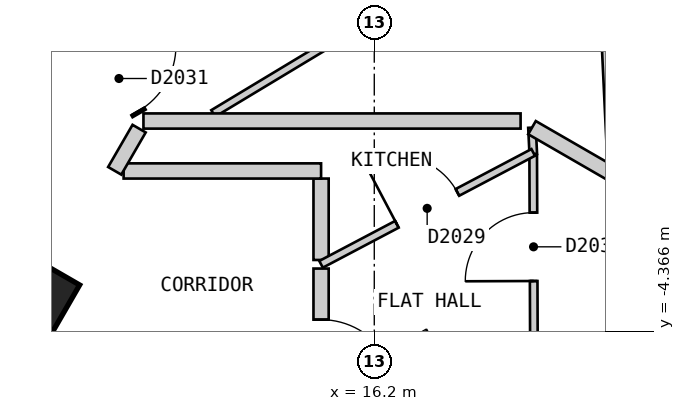
"""IFC4 building model, lengths in metres.
Left out: names, types, materials, properties, quantities, classifications, styles, units other than length and angle.
Written with IfcOpenShell. Run it as: python <this file> out.ifc"""

import sys

from ifc_helpers import new_model, si_unit, direction, frame, frame_2d, origin, origin_2d, place, context, subcontext, project, spatial, polyline, rectangle, outline, extrude, element, fill, save


model = new_model("IFC4")
c1 = context("Model", 3, precision=1e-05, world=origin(), true_north=direction((0.0, 1.0)))
c2 = subcontext(c1, "Body", "Model", "MODEL_VIEW")
j1 = project(units=[si_unit("LENGTHUNIT", "METRE"), si_unit("PLANEANGLEUNIT", "RADIAN")], contexts=[c1])
p1 = place(None, origin())
s1 = spatial("IfcSite", under=j1, at=p1, CompositionType="ELEMENT")
p2 = place(p1, origin())
s2 = spatial("IfcBuilding", under=s1, at=p2, CompositionType="ELEMENT")
p3 = place(p2, frame((0.0, 0.0, 238.8)))
s3 = spatial("IfcBuildingStorey", under=s2, at=p3, CompositionType="ELEMENT", Elevation=238.8)
p4 = place(p3, frame((11.845, -3.884, 0.0), z_axis=(0.0, 0.0, 1.0), x_axis=(0.499984884929, 0.866034130299, 0.0)))
e1 = element("IfcColumn", 1, at=p4, inside=s3, PredefinedType="COLUMN", context=c2, shape_type="SweptSolid", body=[
    extrude(rectangle(XDim=0.7, YDim=0.7, at=origin_2d()), origin(), (0.0, 0.0, 1.0), 3.0),
])
p5 = place(p3, frame((15.285, -18.425, 0.0), z_axis=(0.0, 0.0, 1.0), x_axis=(0.500012653391, 0.866018098222, 0.0)))
e2 = element("IfcWall", 2, at=p5, inside=s3, PredefinedType="SOLIDWALL", context=c2, shape_type="SweptSolid", body=[
    extrude(outline(polyline([(0.0, -0.15), (16.628, -0.15), (16.548, 0.15), (0.08, 0.15), (0.0, -0.15)])), origin(), (0.0, 0.0, 1.0), 2.7),
])
p6 = place(p5, frame((1.165, 0.0, 0.15)))
e3 = element("IfcOpeningElement", 3, at=p6, cuts=e2, PredefinedType="OPENING", context=c2, shape_type="SweptSolid", body=[
    extrude(rectangle(XDim=1.5, YDim=2.1, at=frame_2d((0.75, 1.05))), frame((0.0, 0.16, 0.0), z_axis=(0.0, -1.0, 0.0), x_axis=(1.0, 0.0, 0.0)), (0.0, 0.0, 1.0), 0.32),
])
p7 = place(p5, frame((3.724, 0.0, 0.15)))
e4 = element("IfcOpeningElement", 4, at=p7, cuts=e2, PredefinedType="OPENING", context=c2, shape_type="SweptSolid", body=[
    extrude(rectangle(XDim=1.5, YDim=2.1, at=frame_2d((0.75, 1.05))), frame((0.0, 0.16, 0.0), z_axis=(0.0, -1.0, 0.0), x_axis=(1.0, 0.0, 0.0)), (0.0, 0.0, 1.0), 0.32),
])
p8 = place(p5, frame((6.283, 0.0, 0.15)))
e5 = element("IfcOpeningElement", 5, at=p8, cuts=e2, PredefinedType="OPENING", context=c2, shape_type="SweptSolid", body=[
    extrude(rectangle(XDim=1.5, YDim=2.1, at=frame_2d((0.75, 1.05))), frame((0.0, 0.16, 0.0), z_axis=(0.0, -1.0, 0.0), x_axis=(1.0, 0.0, 0.0)), (0.0, 0.0, 1.0), 0.32),
])
p9 = place(p5, frame((8.843, 0.0, 0.15)))
e6 = element("IfcOpeningElement", 6, at=p9, cuts=e2, PredefinedType="OPENING", context=c2, shape_type="SweptSolid", body=[
    extrude(rectangle(XDim=1.5, YDim=2.1, at=frame_2d((0.75, 1.05))), frame((0.0, 0.16, 0.0), z_axis=(0.0, -1.0, 0.0), x_axis=(1.0, 0.0, 0.0)), (0.0, 0.0, 1.0), 0.32),
])
p10 = place(p5, frame((11.402, 0.0, 0.15)))
e7 = element("IfcOpeningElement", 7, at=p10, cuts=e2, PredefinedType="OPENING", context=c2, shape_type="SweptSolid", body=[
    extrude(rectangle(XDim=1.5, YDim=2.1, at=frame_2d((0.75, 1.05))), frame((0.0, 0.16, 0.0), z_axis=(0.0, -1.0, 0.0), x_axis=(1.0, 0.0, 0.0)), (0.0, 0.0, 1.0), 0.32),
])
p11 = place(p5, frame((13.962, 0.0, 0.15)))
e8 = element("IfcOpeningElement", 8, at=p11, cuts=e2, PredefinedType="OPENING", context=c2, shape_type="SweptSolid", body=[
    extrude(rectangle(XDim=1.5, YDim=2.1, at=frame_2d((0.75, 1.05))), frame((0.0, 0.16, 0.0), z_axis=(0.0, -1.0, 0.0), x_axis=(1.0, 0.0, 0.0)), (0.0, 0.0, 1.0), 0.32),
])
p12 = place(p3, frame((9.238, 5.2, 0.0), z_axis=(0.0, 0.0, 1.0), x_axis=(0.500025705601, -0.86601056214, 0.0)))
e9 = element("IfcWall", 9, at=p12, inside=s3, PredefinedType="PARTITIONING", context=c2, shape_type="SweptSolid", body=[
    extrude(rectangle(XDim=7.735, YDim=0.2, at=frame_2d((3.868, 0.0))), origin(), (0.0, 0.0, 1.0), 2.7),
])
p13 = place(p12, frame((6.705, 0.0, 0.0)))
e10 = element("IfcOpeningElement", 10, at=p13, cuts=e9, PredefinedType="OPENING", context=c2, shape_type="SweptSolid", body=[
    extrude(rectangle(XDim=1.0, YDim=2.1, at=frame_2d((0.5, 1.05))), frame((0.0, 0.11, 0.0), z_axis=(0.0, -1.0, 0.0), x_axis=(1.0, 0.0, 0.0)), (0.0, 0.0, 1.0), 0.22),
])
p14 = place(p12, frame((1.988, 0.0, 0.0)))
e11 = element("IfcOpeningElement", 11, at=p14, cuts=e9, PredefinedType="OPENING", context=c2, shape_type="SweptSolid", body=[
    extrude(rectangle(XDim=1.0, YDim=2.1, at=frame_2d((0.5, 1.05))), frame((0.0, 0.11, 0.0), z_axis=(0.0, -1.0, 0.0), x_axis=(1.0, 0.0, 0.0)), (0.0, 0.0, 1.0), 0.22),
])
p15 = place(p3, frame((15.5, -2.356, 0.0), z_axis=(0.0, 0.0, 1.0), x_axis=(0.0, -1.0, 0.0)))
e12 = element("IfcWall", 12, at=p15, inside=s3, PredefinedType="PARTITIONING", context=c2, shape_type="SweptSolid", body=[
    extrude(rectangle(XDim=1.071, YDim=0.2, at=frame_2d((0.536, 0.0))), origin(), (0.0, 0.0, 1.0), 2.7),
])
p16 = place(p3, frame((12.902, -2.256, 0.0), z_axis=(0.0, 0.0, 1.0), x_axis=(1.0, 0.0, 0.0)))
e13 = element("IfcWall", 13, at=p16, inside=s3, PredefinedType="PARTITIONING", context=c2, shape_type="SweptSolid", body=[
    extrude(rectangle(XDim=2.598, YDim=0.2, at=frame_2d((1.299, 0.0))), origin(), (0.0, 0.0, 1.0), 2.7),
])
p17 = place(p3, frame((12.785, -2.254, 0.0), z_axis=(0.0, 0.0, 1.0), x_axis=(0.500766044352, 0.865582675903, 0.0)))
e14 = element("IfcWall", 14, at=p17, inside=s3, PredefinedType="PARTITIONING", context=c2, shape_type="SweptSolid", body=[
    extrude(rectangle(XDim=0.641, YDim=0.2, at=frame_2d((0.321, 0.0))), origin(), (0.0, 0.0, 1.0), 2.7),
])
p18 = place(p3, frame((15.5, -5.856, 0.0), z_axis=(0.0, 0.0, 1.0), x_axis=(0.0, 1.0, 0.0)))
e15 = element("IfcWall", 15, at=p18, inside=s3, PredefinedType="PARTITIONING", context=c2, shape_type="SweptSolid", body=[
    extrude(rectangle(XDim=2.316, YDim=0.2, at=frame_2d((1.158, 0.0))), origin(), (0.0, 0.0, 1.0), 2.7),
])
p19 = place(p18, frame((0.644, 0.0, 0.0)))
e16 = element("IfcOpeningElement", 16, at=p19, cuts=e15, PredefinedType="OPENING", context=c2, shape_type="SweptSolid", body=[
    extrude(rectangle(XDim=1.0, YDim=2.1, at=frame_2d((0.5, 1.05))), frame((0.0, 0.11, 0.0), z_axis=(0.0, -1.0, 0.0), x_axis=(1.0, 0.0, 0.0)), (0.0, 0.0, 1.0), 0.22),
])
p20 = place(p3, frame((18.275, -1.686, 0.0), z_axis=(0.0, 0.0, 1.0), x_axis=(0.049063646166, -0.998795654088, 0.0)))
e17 = element("IfcWall", 17, at=p20, inside=s3, PredefinedType="PARTITIONING", context=c2, shape_type="SweptSolid", body=[
    extrude(rectangle(XDim=0.348, YDim=0.1, at=frame_2d((0.174, 0.0))), origin(), (0.0, 0.0, 1.0), 2.7),
])
p21 = place(p3, frame((19.151, 1.343, 0.0), z_axis=(0.0, 0.0, 1.0), x_axis=(0.047509130714, -0.998870803707, 0.0)))
e18 = element("IfcWall", 18, at=p21, inside=s3, PredefinedType="PARTITIONING", context=c2, shape_type="SweptSolid", body=[
    extrude(rectangle(XDim=3.52, YDim=0.1, at=frame_2d((1.76, 0.0))), origin(), (0.0, 0.0, 1.0), 2.7),
])
p22 = place(p3, frame((18.291, -2.048, 0.0), z_axis=(0.0, 0.0, 1.0), x_axis=(0.003743776253, -0.999992992045, 0.0)))
e19 = element("IfcWall", 19, at=p22, inside=s3, PredefinedType="PARTITIONING", context=c2, shape_type="SweptSolid", body=[
    extrude(rectangle(XDim=2.413, YDim=0.1, at=frame_2d((1.207, 0.0))), origin(), (0.0, 0.0, 1.0), 2.7),
])
p23 = place(p22, frame((0.756, 0.0, 0.0)))
e20 = element("IfcOpeningElement", 20, at=p23, cuts=e19, PredefinedType="OPENING", context=c2, shape_type="SweptSolid", body=[
    extrude(rectangle(XDim=0.9, YDim=2.1, at=frame_2d((0.45, 1.05))), frame((0.0, 0.06, 0.0), z_axis=(0.0, -1.0, 0.0), x_axis=(1.0, 0.0, 0.0)), (0.0, 0.0, 1.0), 0.12),
])
p24 = place(p3, frame((15.5, -3.484, 0.0), z_axis=(0.0, 0.0, 1.0), x_axis=(0.884530210683, 0.466482911145, 0.0)))
e21 = element("IfcWall", 21, at=p24, inside=s3, PredefinedType="PARTITIONING", context=c2, shape_type="SweptSolid", body=[
    extrude(rectangle(XDim=3.155, YDim=0.1, at=frame_2d((1.578, 0.0))), origin(), (0.0, 0.0, 1.0), 2.7),
])
p25 = place(p24, frame((1.128, 0.0, 0.0)))
e22 = element("IfcOpeningElement", 22, at=p25, cuts=e21, PredefinedType="OPENING", context=c2, shape_type="SweptSolid", body=[
    extrude(rectangle(XDim=0.9, YDim=2.1, at=frame_2d((0.45, 1.05))), frame((0.0, 0.06, 0.0), z_axis=(0.0, -1.0, 0.0), x_axis=(1.0, 0.0, 0.0)), (0.0, 0.0, 1.0), 0.12),
])
p26 = place(p3, frame((14.081, -1.499, 0.0), z_axis=(0.0, 0.0, 1.0), x_axis=(0.85652273816, 0.516109289798, 0.0)))
e23 = element("IfcWall", 23, at=p26, inside=s3, PredefinedType="PARTITIONING", context=c2, shape_type="SweptSolid", body=[
    extrude(rectangle(XDim=5.537, YDim=0.1, at=frame_2d((2.769, 0.0))), origin(), (0.0, 0.0, 1.0), 2.7),
])
p27 = place(p26, frame((2.267, 0.0, 0.0)))
e24 = element("IfcOpeningElement", 24, at=p27, cuts=e23, PredefinedType="OPENING", context=c2, shape_type="SweptSolid", body=[
    extrude(rectangle(XDim=0.9, YDim=2.1, at=frame_2d((0.45, 1.05))), frame((0.0, 0.06, 0.0), z_axis=(0.0, -1.0, 0.0), x_axis=(1.0, 0.0, 0.0)), (0.0, 0.0, 1.0), 0.12),
])
p28 = place(p3, frame((18.275, -1.686, 0.0), z_axis=(0.0, 0.0, 1.0), x_axis=(0.866041167766, -0.49997269499, 0.0)))
e25 = element("IfcWall", 25, at=p28, inside=s3, PredefinedType="PARTITIONING", context=c2, shape_type="SweptSolid", body=[
    extrude(rectangle(XDim=5.63, YDim=0.2, at=frame_2d((2.815, 0.0))), origin(), (0.0, 0.0, 1.0), 2.7),
])
p29 = place(p3, frame((13.163, -1.599, 0.0), z_axis=(0.0, 0.0, 1.0), x_axis=(1.0, 0.0, 0.0)))
e26 = element("IfcWall", 26, at=p29, inside=s3, PredefinedType="PARTITIONING", context=c2, shape_type="SweptSolid", body=[
    extrude(rectangle(XDim=4.962, YDim=0.2, at=frame_2d((2.481, 0.0))), origin(), (0.0, 0.0, 1.0), 2.7),
])
p30 = place(p19, origin())
e27 = element("IfcDoor", 27, at=p30, inside=s3, OperationType="SINGLE_SWING_LEFT", PredefinedType="DOOR", context=c2, shape_type="SweptSolid", body=[
    extrude(rectangle(XDim=1.0, YDim=2.1, at=frame_2d((0.5, 1.05))), frame((0.0, 0.025, 0.0), z_axis=(0.0, -1.0, 0.0), x_axis=(1.0, 0.0, 0.0)), (0.0, 0.0, 1.0), 0.05),
])
fill(e16, e27)
p31 = place(p25, origin())
e28 = element("IfcDoor", 28, at=p31, inside=s3, OperationType="SINGLE_SWING_LEFT", PredefinedType="DOOR", context=c2, shape_type="SweptSolid", body=[
    extrude(rectangle(XDim=0.9, YDim=2.1, at=frame_2d((0.45, 1.05))), frame((0.0, 0.025, 0.0), z_axis=(0.0, -1.0, 0.0), x_axis=(1.0, 0.0, 0.0)), (0.0, 0.0, 1.0), 0.05),
])
fill(e22, e28)
p32 = place(p23, origin())
e29 = element("IfcDoor", 29, at=p32, inside=s3, OperationType="SINGLE_SWING_RIGHT", PredefinedType="DOOR", context=c2, shape_type="SweptSolid", body=[
    extrude(rectangle(XDim=0.9, YDim=2.1, at=frame_2d((0.45, 1.05))), frame((0.0, 0.025, 0.0), z_axis=(0.0, -1.0, 0.0), x_axis=(1.0, 0.0, 0.0)), (0.0, 0.0, 1.0), 0.05),
])
fill(e20, e29)
p33 = place(p13, origin())
e30 = element("IfcDoor", 30, at=p33, inside=s3, OperationType="SINGLE_SWING_LEFT", PredefinedType="DOOR", context=c2, shape_type="SweptSolid", body=[
    extrude(rectangle(XDim=1.0, YDim=2.1, at=frame_2d((0.5, 1.05))), frame((0.0, 0.025, 0.0), z_axis=(0.0, -1.0, 0.0), x_axis=(1.0, 0.0, 0.0)), (0.0, 0.0, 1.0), 0.05),
])
fill(e10, e30)
save(model, sys.argv[1])
